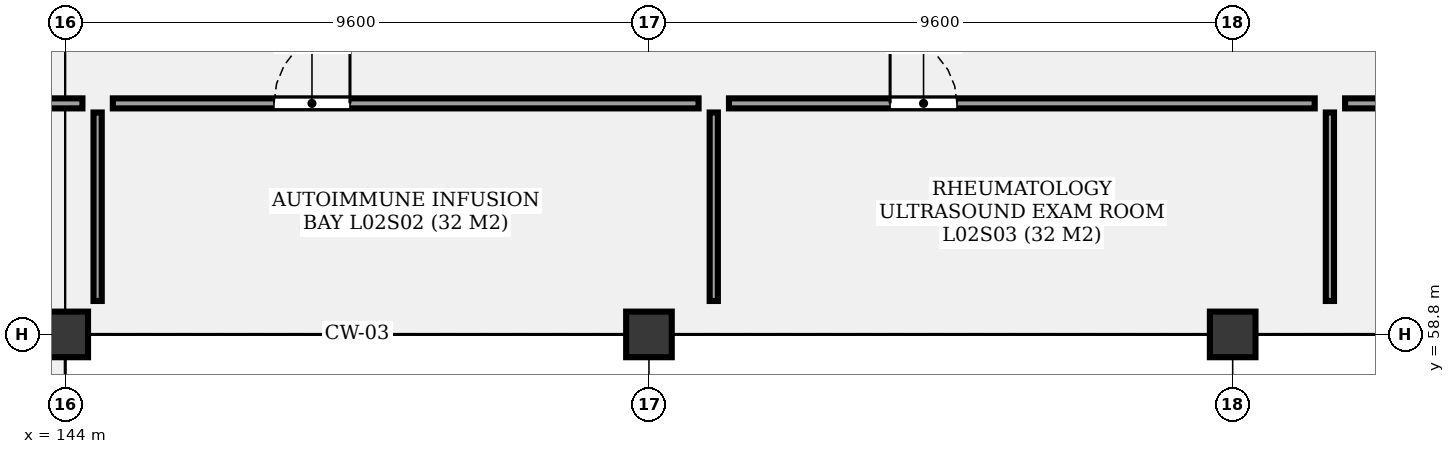
"""IFC4 building model, lengths in metres.
Left out: names, types, materials, properties, quantities, classifications, styles, units other than length and angle.
Written with IfcOpenShell. Run it as: python <this file> out.ifc"""

import sys

from ifc_helpers import new_model, si_unit, direction, frame, frame_2d, origin, origin_2d, place, context, subcontext, project, spatial, rectangle, extrude, element, fill, save


model = new_model("IFC4")
c1 = context("Model", 3, precision=1e-05, world=origin(), true_north=direction((0.0, 1.0)))
c2 = subcontext(c1, "Body", "Model", "MODEL_VIEW")
j1 = project(units=[si_unit("LENGTHUNIT", "METRE"), si_unit("PLANEANGLEUNIT", "RADIAN")], contexts=[c1])
p1 = place(None, origin())
s1 = spatial("IfcSite", under=j1, at=p1, CompositionType="ELEMENT")
p2 = place(p1, origin())
s2 = spatial("IfcBuilding", under=s1, at=p2, CompositionType="ELEMENT")
p3 = place(p2, frame((0.0, 0.0, 9.9)))
s3 = spatial("IfcBuildingStorey", under=s2, at=p3, CompositionType="ELEMENT", Elevation=9.9)
for number, where, z_axis, x_axis in (
    (1, (144.0, 58.8, 0.0), (0.0, 0.0, 1.0), (1.0, 0.0, 0.0)),
    (2, (153.6, 58.8, 0.0), (0.0, 0.0, 1.0), (1.0, 0.0, 0.0)),
    (3, (163.2, 58.8, 0.0), (0.0, 0.0, 1.0), (1.0, 0.0, 0.0)),
):
    element("IfcColumn", number, at=place(p3, frame(where, z_axis=z_axis, x_axis=x_axis)), inside=s3, PredefinedType="COLUMN", context=c2, shape_type="SweptSolid", body=[
        extrude(rectangle(XDim=0.75, YDim=0.75, at=origin_2d()), origin(), (0.0, 0.0, 1.0), 3.6),
    ])
p4 = place(p3, frame((134.65, 62.6, 0.0), z_axis=(0.0, 0.0, 1.0), x_axis=(1.0, 0.0, 0.0)))
e4 = element("IfcWall", 4, at=p4, inside=s3, PredefinedType="PARTITIONING", context=c2, shape_type="SweptSolid", body=[
    extrude(rectangle(XDim=9.633, YDim=0.165, at=frame_2d((4.816, 0.0))), origin(), (0.0, 0.0, 1.0), 2.48),
])
p5 = place(p4, frame((2.65, 0.0, 0.0)))
e5 = element("IfcOpeningElement", 5, at=p5, cuts=e4, PredefinedType="OPENING", context=c2, shape_type="SweptSolid", body=[
    extrude(rectangle(XDim=1.1, YDim=2.1, at=frame_2d((0.55, 1.05))), frame((0.0, 0.093, 0.0), z_axis=(0.0, -1.0, 0.0), x_axis=(1.0, 0.0, 0.0)), (0.0, 0.0, 1.0), 0.185),
])
p6 = place(p3, frame((144.783, 62.6, 0.0), z_axis=(0.0, 0.0, 1.0), x_axis=(1.0, 0.0, 0.0)))
e6 = element("IfcWall", 6, at=p6, inside=s3, PredefinedType="PARTITIONING", context=c2, shape_type="SweptSolid", body=[
    extrude(rectangle(XDim=9.633, YDim=0.165, at=frame_2d((4.816, 0.0))), origin(), (0.0, 0.0, 1.0), 2.48),
])
p7 = place(p6, frame((2.65, 0.0, 0.0)))
e7 = element("IfcOpeningElement", 7, at=p7, cuts=e6, PredefinedType="OPENING", context=c2, shape_type="SweptSolid", body=[
    extrude(rectangle(XDim=1.25, YDim=2.2, at=frame_2d((0.625, 1.1))), frame((0.0, 0.093, 0.0), z_axis=(0.0, -1.0, 0.0), x_axis=(1.0, 0.0, 0.0)), (0.0, 0.0, 1.0), 0.185),
])
p8 = place(p3, frame((144.533, 59.35, 0.0), z_axis=(0.0, 0.0, 1.0), x_axis=(0.0, 1.0, 0.0)))
e8 = element("IfcWall", 8, at=p8, inside=s3, PredefinedType="PARTITIONING", context=c2, shape_type="SweptSolid", body=[
    extrude(rectangle(XDim=3.1, YDim=0.135, at=frame_2d((1.55, 0.0))), origin(), (0.0, 0.0, 1.0), 2.48),
])
p9 = place(p3, frame((154.916, 62.6, 0.0), z_axis=(0.0, 0.0, 1.0), x_axis=(1.0, 0.0, 0.0)))
e9 = element("IfcWall", 9, at=p9, inside=s3, PredefinedType="PARTITIONING", context=c2, shape_type="SweptSolid", body=[
    extrude(rectangle(XDim=9.633, YDim=0.165, at=frame_2d((4.816, 0.0))), origin(), (0.0, 0.0, 1.0), 2.48),
])
p10 = place(p9, frame((2.65, 0.0, 0.0)))
e10 = element("IfcOpeningElement", 10, at=p10, cuts=e9, PredefinedType="OPENING", context=c2, shape_type="SweptSolid", body=[
    extrude(rectangle(XDim=1.1, YDim=2.1, at=frame_2d((0.55, 1.05))), frame((0.0, 0.093, 0.0), z_axis=(0.0, -1.0, 0.0), x_axis=(1.0, 0.0, 0.0)), (0.0, 0.0, 1.0), 0.185),
])
p11 = place(p3, frame((154.666, 59.35, 0.0), z_axis=(0.0, 0.0, 1.0), x_axis=(0.0, 1.0, 0.0)))
e11 = element("IfcWall", 11, at=p11, inside=s3, PredefinedType="PARTITIONING", context=c2, shape_type="SweptSolid", body=[
    extrude(rectangle(XDim=3.1, YDim=0.135, at=frame_2d((1.55, 0.0))), origin(), (0.0, 0.0, 1.0), 2.48),
])
p12 = place(p3, frame((165.049, 62.6, 0.0), z_axis=(0.0, 0.0, 1.0), x_axis=(1.0, 0.0, 0.0)))
e12 = element("IfcWall", 12, at=p12, inside=s3, PredefinedType="PARTITIONING", context=c2, shape_type="SweptSolid", body=[
    extrude(rectangle(XDim=9.633, YDim=0.165, at=frame_2d((4.816, 0.0))), origin(), (0.0, 0.0, 1.0), 2.48),
])
p13 = place(p12, frame((2.3, 0.0, 0.0)))
e13 = element("IfcOpeningElement", 13, at=p13, cuts=e12, PredefinedType="OPENING", context=c2, shape_type="SweptSolid", body=[
    extrude(rectangle(XDim=1.25, YDim=2.2, at=frame_2d((0.625, 1.1))), frame((0.0, 0.093, 0.0), z_axis=(0.0, -1.0, 0.0), x_axis=(1.0, 0.0, 0.0)), (0.0, 0.0, 1.0), 0.185),
])
p14 = place(p3, frame((164.799, 59.35, 0.0), z_axis=(0.0, 0.0, 1.0), x_axis=(0.0, 1.0, 0.0)))
e14 = element("IfcWall", 14, at=p14, inside=s3, PredefinedType="PARTITIONING", context=c2, shape_type="SweptSolid", body=[
    extrude(rectangle(XDim=3.1, YDim=0.135, at=frame_2d((1.55, 0.0))), origin(), (0.0, 0.0, 1.0), 2.48),
])
p15 = place(p7, origin())
e15 = element("IfcDoor", 15, at=p15, inside=s3, OperationType="SINGLE_SWING_RIGHT", PredefinedType="DOOR", context=c2, shape_type="SweptSolid", body=[
    extrude(rectangle(XDim=1.25, YDim=2.2, at=frame_2d((0.625, 1.1))), frame((0.0, 0.025, 0.0), z_axis=(0.0, -1.0, 0.0), x_axis=(1.0, 0.0, 0.0)), (0.0, 0.0, 1.0), 0.05),
])
fill(e7, e15)
p16 = place(p10, origin())
e16 = element("IfcDoor", 16, at=p16, inside=s3, OperationType="SINGLE_SWING_LEFT", PredefinedType="DOOR", context=c2, shape_type="SweptSolid", body=[
    extrude(rectangle(XDim=1.1, YDim=2.1, at=frame_2d((0.55, 1.05))), frame((0.0, 0.025, 0.0), z_axis=(0.0, -1.0, 0.0), x_axis=(1.0, 0.0, 0.0)), (0.0, 0.0, 1.0), 0.05),
])
fill(e10, e16)
save(model, sys.argv[1])
